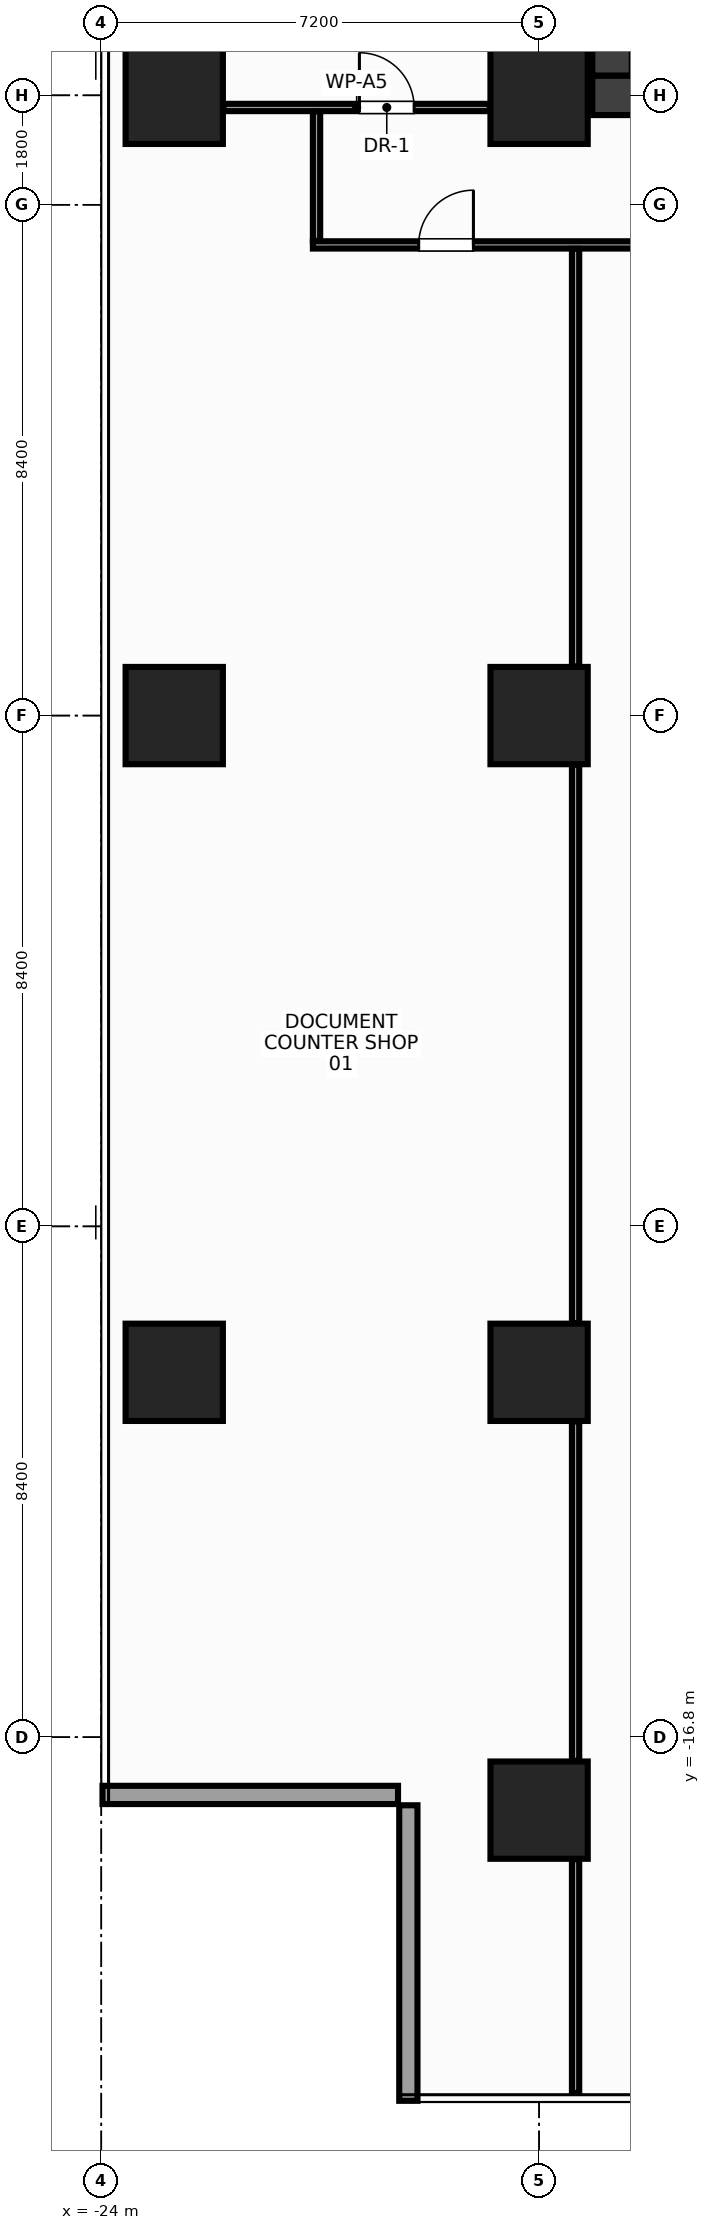
"""IFC4 building model, lengths in metres.
Left out: names, types, materials, properties, quantities, classifications, styles, units other than length and angle.
Written with IfcOpenShell. Run it as: python <this file> out.ifc"""

import sys

from ifc_helpers import new_model, si_unit, direction, frame, frame_2d, origin, origin_2d, place, context, subcontext, project, spatial, rectangle, extrude, source, transform, mapped, element, fill, save


model = new_model("IFC4")
c1 = context("Model", 3, precision=1e-05, world=origin(), true_north=direction((0.0, 1.0)))
c2 = subcontext(c1, "Body", "Model", "MODEL_VIEW")
j1 = project(units=[si_unit("LENGTHUNIT", "METRE"), si_unit("PLANEANGLEUNIT", "RADIAN")], contexts=[c1])
p1 = place(None, origin())
s1 = spatial("IfcSite", under=j1, at=p1, CompositionType="ELEMENT")
p2 = place(p1, origin())
s2 = spatial("IfcBuilding", under=s1, at=p2, CompositionType="ELEMENT")
p3 = place(p2, frame((0.0, 0.0, 138.8)))
s3 = spatial("IfcBuildingStorey", under=s2, at=p3, CompositionType="ELEMENT", Elevation=138.8)
m1 = source(origin(), c2, "Body", "SweptSolid", [
    extrude(rectangle(XDim=31.85, YDim=0.65, at=frame_2d((15.925, 0.0))), origin(), (0.0, 0.0, 1.0), 3.6),
])
p4 = place(p3, frame((-15.925, 10.2, 0.0), z_axis=(0.0, 0.0, 1.0), x_axis=(1.0, 0.0, 0.0)))
e1 = element("IfcWall", 1, at=p4, inside=s3, PredefinedType="SHEAR", context=c2, shape_type="MappedRepresentation", body=[
    mapped(m1, transform((0.0, 0.0, 0.0), x_axis=(1.0, 0.0, 0.0), y_axis=(0.0, 1.0, 0.0), z_axis=(0.0, 0.0, 1.0), scale=1.0)),
])
p5 = place(p4, frame((1.775, 0.0, 0.0)))
e2 = element("IfcOpeningElement", 2, at=p5, cuts=e1, PredefinedType="OPENING", context=c2, shape_type="SweptSolid", body=[
    extrude(rectangle(XDim=1.6, YDim=2.15, at=frame_2d((0.8, 1.075))), frame((0.0, 0.337, 0.0), z_axis=(0.0, -1.0, 0.0), x_axis=(1.0, 0.0, 0.0)), (0.0, 0.0, 1.0), 0.674),
])
p6 = place(p4, frame((28.475, 0.0, 0.0)))
e3 = element("IfcOpeningElement", 3, at=p6, cuts=e1, PredefinedType="OPENING", context=c2, shape_type="SweptSolid", body=[
    extrude(rectangle(XDim=1.6, YDim=2.15, at=frame_2d((0.8, 1.075))), frame((0.0, 0.337, 0.0), z_axis=(0.0, -1.0, 0.0), x_axis=(1.0, 0.0, 0.0)), (0.0, 0.0, 1.0), 0.674),
])
p7 = place(p4, frame((15.175, 0.0, 0.0)))
e4 = element("IfcOpeningElement", 4, at=p7, cuts=e1, PredefinedType="OPENING", context=c2, shape_type="SweptSolid", body=[
    extrude(rectangle(XDim=1.5, YDim=2.2, at=frame_2d((0.75, 1.1))), frame((0.0, 0.337, 0.0), z_axis=(0.0, -1.0, 0.0), x_axis=(1.0, 0.0, 0.0)), (0.0, 0.0, 1.0), 0.674),
])
m2 = source(origin(), c2, "Body", "SweptSolid", [
    extrude(rectangle(XDim=12.95, YDim=0.65, at=frame_2d((6.475, 0.0))), origin(), (0.0, 0.0, 1.0), 3.6),
])
p8 = place(p3, frame((-15.6, 10.525, 0.0), z_axis=(0.0, 0.0, 1.0), x_axis=(0.0, 1.0, 0.0)))
e5 = element("IfcWall", 5, at=p8, inside=s3, PredefinedType="SHEAR", context=c2, shape_type="MappedRepresentation", body=[
    mapped(m2, transform((0.0, 0.0, 0.0), x_axis=(1.0, 0.0, 0.0), y_axis=(0.0, 1.0, 0.0), z_axis=(0.0, 0.0, 1.0), scale=1.0)),
])
m3 = source(origin(), c2, "Body", "SweptSolid", [
    extrude(rectangle(XDim=1.6, YDim=1.6, at=origin_2d()), origin(), (0.0, 0.0, 1.0), 3.6),
])
for number, where, z_axis, x_axis in (
    (6, (-16.8, -18.0, 0.0), (0.0, 0.0, 1.0), (1.0, 0.0, 0.0)),
    (7, (-16.8, -10.8, 0.0), (0.0, 0.0, 1.0), (1.0, 0.0, 0.0)),
    (8, (-16.8, 0.0, 0.0), (0.0, 0.0, 1.0), (1.0, 0.0, 0.0)),
    (9, (-16.8, 10.2, 0.0), (0.0, 0.0, 1.0), (1.0, 0.0, 0.0)),
    (10, (-22.8, -10.8, 0.0), (0.0, 0.0, 1.0), (1.0, 0.0, 0.0)),
    (11, (-22.8, 0.0, 0.0), (0.0, 0.0, 1.0), (1.0, 0.0, 0.0)),
    (12, (-22.8, 10.2, 0.0), (0.0, 0.0, 1.0), (1.0, 0.0, 0.0)),
):
    element("IfcColumn", number, at=place(p3, frame(where, z_axis=z_axis, x_axis=x_axis)), inside=s3, PredefinedType="COLUMN", context=c2, shape_type="MappedRepresentation", body=[
        mapped(m3, transform((0.0, 0.0, 0.0), x_axis=(1.0, 0.0, 0.0), y_axis=(0.0, 1.0, 0.0), z_axis=(0.0, 0.0, 1.0), scale=1.0)),
    ])
m4 = source(origin(), c2, "Body", "SweptSolid", [
    extrude(rectangle(XDim=4.86, YDim=0.3, at=frame_2d((2.43, 0.0))), origin(), (0.0, 0.0, 1.0), 2.76),
])
p9 = place(p3, frame((-23.98, -17.75, 0.0), z_axis=(0.0, 0.0, 1.0), x_axis=(1.0, 0.0, 0.0)))
e13 = element("IfcWall", 13, at=p9, inside=s3, PredefinedType="STANDARD", context=c2, shape_type="MappedRepresentation", body=[
    mapped(m4, transform((0.0, 0.0, 0.0), x_axis=(1.0, 0.0, 0.0), y_axis=(0.0, 1.0, 0.0), z_axis=(0.0, 0.0, 1.0), scale=1.0)),
])
m5 = source(origin(), c2, "Body", "SweptSolid", [
    extrude(rectangle(XDim=4.86, YDim=0.3, at=frame_2d((2.43, 0.0))), origin(), (0.0, 0.0, 1.0), 2.76),
])
p10 = place(p3, frame((-18.95, -17.92, 0.0), z_axis=(0.0, 0.0, 1.0), x_axis=(0.0, -1.0, 0.0)))
e14 = element("IfcWall", 14, at=p10, inside=s3, PredefinedType="STANDARD", context=c2, shape_type="MappedRepresentation", body=[
    mapped(m5, transform((0.0, 0.0, 0.0), x_axis=(1.0, 0.0, 0.0), y_axis=(0.0, 1.0, 0.0), z_axis=(0.0, 0.0, 1.0), scale=1.0)),
])
m6 = source(origin(), c2, "Body", "SweptSolid", [
    extrude(rectangle(XDim=4.38, YDim=0.12, at=frame_2d((2.19, 0.0))), origin(), (0.0, 0.0, 1.0), 2.915),
])
p11 = place(p3, frame((-21.99, 10.0, 0.0), z_axis=(0.0, 0.0, 1.0), x_axis=(1.0, 0.0, 0.0)))
e15 = element("IfcWall", 15, at=p11, inside=s3, PredefinedType="PARTITIONING", context=c2, shape_type="MappedRepresentation", body=[
    mapped(m6, transform((0.0, 0.0, 0.0), x_axis=(1.0, 0.0, 0.0), y_axis=(0.0, 1.0, 0.0), z_axis=(0.0, 0.0, 1.0), scale=1.0)),
])
p12 = place(p11, frame((2.235, 0.0, 0.0)))
e16 = element("IfcOpeningElement", 16, at=p12, cuts=e15, PredefinedType="OPENING", context=c2, shape_type="SweptSolid", body=[
    extrude(rectangle(XDim=0.9, YDim=2.15, at=frame_2d((0.45, 1.075))), frame((0.0, 0.072, 0.0), z_axis=(0.0, -1.0, 0.0), x_axis=(1.0, 0.0, 0.0)), (0.0, 0.0, 1.0), 0.144),
])
m7 = source(origin(), c2, "Body", "SweptSolid", [
    extrude(rectangle(XDim=31.6, YDim=0.12, at=frame_2d((15.8, 0.0))), origin(), (0.0, 0.0, 1.0), 2.765),
])
p13 = place(p3, frame((-20.52, 7.74, 0.0), z_axis=(0.0, 0.0, 1.0), x_axis=(1.0, 0.0, 0.0)))
e17 = element("IfcWall", 17, at=p13, inside=s3, PredefinedType="PARTITIONING", context=c2, shape_type="MappedRepresentation", body=[
    mapped(m7, transform((0.0, 0.0, 0.0), x_axis=(1.0, 0.0, 0.0), y_axis=(0.0, 1.0, 0.0), z_axis=(0.0, 0.0, 1.0), scale=1.0)),
])
p14 = place(p13, frame((1.74, 0.0, 0.0)))
e18 = element("IfcOpeningElement", 18, at=p14, cuts=e17, PredefinedType="OPENING", context=c2, shape_type="SweptSolid", body=[
    extrude(rectangle(XDim=0.9, YDim=2.15, at=frame_2d((0.45, 1.075))), frame((0.0, 0.072, 0.0), z_axis=(0.0, -1.0, 0.0), x_axis=(1.0, 0.0, 0.0)), (0.0, 0.0, 1.0), 0.144),
])
p15 = place(p13, frame((30.28, 0.0, 0.0)))
e19 = element("IfcOpeningElement", 19, at=p15, cuts=e17, PredefinedType="OPENING", context=c2, shape_type="SweptSolid", body=[
    extrude(rectangle(XDim=0.9, YDim=2.15, at=frame_2d((0.45, 1.075))), frame((0.0, 0.072, 0.0), z_axis=(0.0, -1.0, 0.0), x_axis=(1.0, 0.0, 0.0)), (0.0, 0.0, 1.0), 0.144),
])
p16 = place(p13, frame((10.67, 0.0, 0.0)))
e20 = element("IfcOpeningElement", 20, at=p16, cuts=e17, PredefinedType="OPENING", context=c2, shape_type="SweptSolid", body=[
    extrude(rectangle(XDim=0.9, YDim=2.15, at=frame_2d((0.45, 1.075))), frame((0.0, 0.072, 0.0), z_axis=(0.0, -1.0, 0.0), x_axis=(1.0, 0.0, 0.0)), (0.0, 0.0, 1.0), 0.144),
])
p17 = place(p13, frame((23.47, 0.0, 0.0)))
e21 = element("IfcOpeningElement", 21, at=p17, cuts=e17, PredefinedType="OPENING", context=c2, shape_type="SweptSolid", body=[
    extrude(rectangle(XDim=0.9, YDim=2.15, at=frame_2d((0.45, 1.075))), frame((0.0, 0.072, 0.0), z_axis=(0.0, -1.0, 0.0), x_axis=(1.0, 0.0, 0.0)), (0.0, 0.0, 1.0), 0.144),
])
m8 = source(origin(), c2, "Body", "SweptSolid", [
    extrude(rectangle(XDim=2.13, YDim=0.12, at=frame_2d((1.065, 0.0))), origin(), (0.0, 0.0, 1.0), 3.38),
])
p18 = place(p3, frame((-20.46, 7.805, 0.0), z_axis=(0.0, 0.0, 1.0), x_axis=(0.0, 1.0, 0.0)))
e22 = element("IfcWall", 22, at=p18, inside=s3, PredefinedType="PARTITIONING", context=c2, shape_type="MappedRepresentation", body=[
    mapped(m8, transform((0.0, 0.0, 0.0), x_axis=(1.0, 0.0, 0.0), y_axis=(0.0, 1.0, 0.0), z_axis=(0.0, 0.0, 1.0), scale=1.0)),
])
m9 = source(origin(), c2, "Body", "SweptSolid", [
    extrude(rectangle(XDim=3.84, YDim=0.12, at=frame_2d((1.92, 0.0))), origin(), (0.0, 0.0, 1.0), 3.38),
])
p19 = place(p3, frame((-16.2, -22.65, 0.0), z_axis=(0.0, 0.0, 1.0), x_axis=(0.0, 1.0, 0.0)))
e23 = element("IfcWall", 23, at=p19, inside=s3, PredefinedType="PARTITIONING", context=c2, shape_type="MappedRepresentation", body=[
    mapped(m9, transform((0.0, 0.0, 0.0), x_axis=(1.0, 0.0, 0.0), y_axis=(0.0, 1.0, 0.0), z_axis=(0.0, 0.0, 1.0), scale=1.0)),
])
m10 = source(origin(), c2, "Body", "SweptSolid", [
    extrude(rectangle(XDim=5.58, YDim=0.12, at=frame_2d((2.79, 0.0))), origin(), (0.0, 0.0, 1.0), 3.38),
])
p20 = place(p3, frame((-16.2, -17.19, 0.0), z_axis=(0.0, 0.0, 1.0), x_axis=(0.0, 1.0, 0.0)))
e24 = element("IfcWall", 24, at=p20, inside=s3, PredefinedType="PARTITIONING", context=c2, shape_type="MappedRepresentation", body=[
    mapped(m10, transform((0.0, 0.0, 0.0), x_axis=(1.0, 0.0, 0.0), y_axis=(0.0, 1.0, 0.0), z_axis=(0.0, 0.0, 1.0), scale=1.0)),
])
m11 = source(origin(), c2, "Body", "SweptSolid", [
    extrude(rectangle(XDim=9.18, YDim=0.12, at=frame_2d((4.59, 0.0))), origin(), (0.0, 0.0, 1.0), 3.38),
])
p21 = place(p3, frame((-16.2, -9.99, 0.0), z_axis=(0.0, 0.0, 1.0), x_axis=(0.0, 1.0, 0.0)))
e25 = element("IfcWall", 25, at=p21, inside=s3, PredefinedType="PARTITIONING", context=c2, shape_type="MappedRepresentation", body=[
    mapped(m11, transform((0.0, 0.0, 0.0), x_axis=(1.0, 0.0, 0.0), y_axis=(0.0, 1.0, 0.0), z_axis=(0.0, 0.0, 1.0), scale=1.0)),
])
m12 = source(origin(), c2, "Body", "SweptSolid", [
    extrude(rectangle(XDim=6.865, YDim=0.12, at=frame_2d((3.433, 0.0))), origin(), (0.0, 0.0, 1.0), 2.665),
])
p22 = place(p3, frame((-16.2, 0.81, 0.0), z_axis=(0.0, 0.0, 1.0), x_axis=(0.0, 1.0, 0.0)))
e26 = element("IfcWall", 26, at=p22, inside=s3, PredefinedType="PARTITIONING", context=c2, shape_type="MappedRepresentation", body=[
    mapped(m12, transform((0.0, 0.0, 0.0), x_axis=(1.0, 0.0, 0.0), y_axis=(0.0, 1.0, 0.0), z_axis=(0.0, 0.0, 1.0), scale=1.0)),
])
m13 = source(origin(), c2, "Body", "SweptSolid", [
    extrude(rectangle(XDim=0.9, YDim=2.15, at=frame_2d((0.45, 1.075))), frame((0.0, 0.025, 0.0), z_axis=(0.0, -1.0, 0.0), x_axis=(1.0, 0.0, 0.0)), (0.0, 0.0, 1.0), 0.05),
])
p23 = place(p12, origin())
e27 = element("IfcDoor", 27, at=p23, inside=s3, OperationType="SINGLE_SWING_LEFT", PredefinedType="DOOR", context=c2, shape_type="MappedRepresentation", body=[
    mapped(m13, transform((0.0, 0.0, 0.0), x_axis=(1.0, 0.0, 0.0), y_axis=(0.0, 1.0, 0.0), z_axis=(0.0, 0.0, 1.0), scale=1.0)),
])
fill(e16, e27)
p24 = place(p14, origin())
e28 = element("IfcDoor", 28, at=p24, inside=s3, OperationType="SINGLE_SWING_RIGHT", PredefinedType="DOOR", context=c2, shape_type="MappedRepresentation", body=[
    mapped(m13, transform((0.0, 0.0, 0.0), x_axis=(1.0, 0.0, 0.0), y_axis=(0.0, 1.0, 0.0), z_axis=(0.0, 0.0, 1.0), scale=1.0)),
])
fill(e18, e28)
save(model, sys.argv[1])
